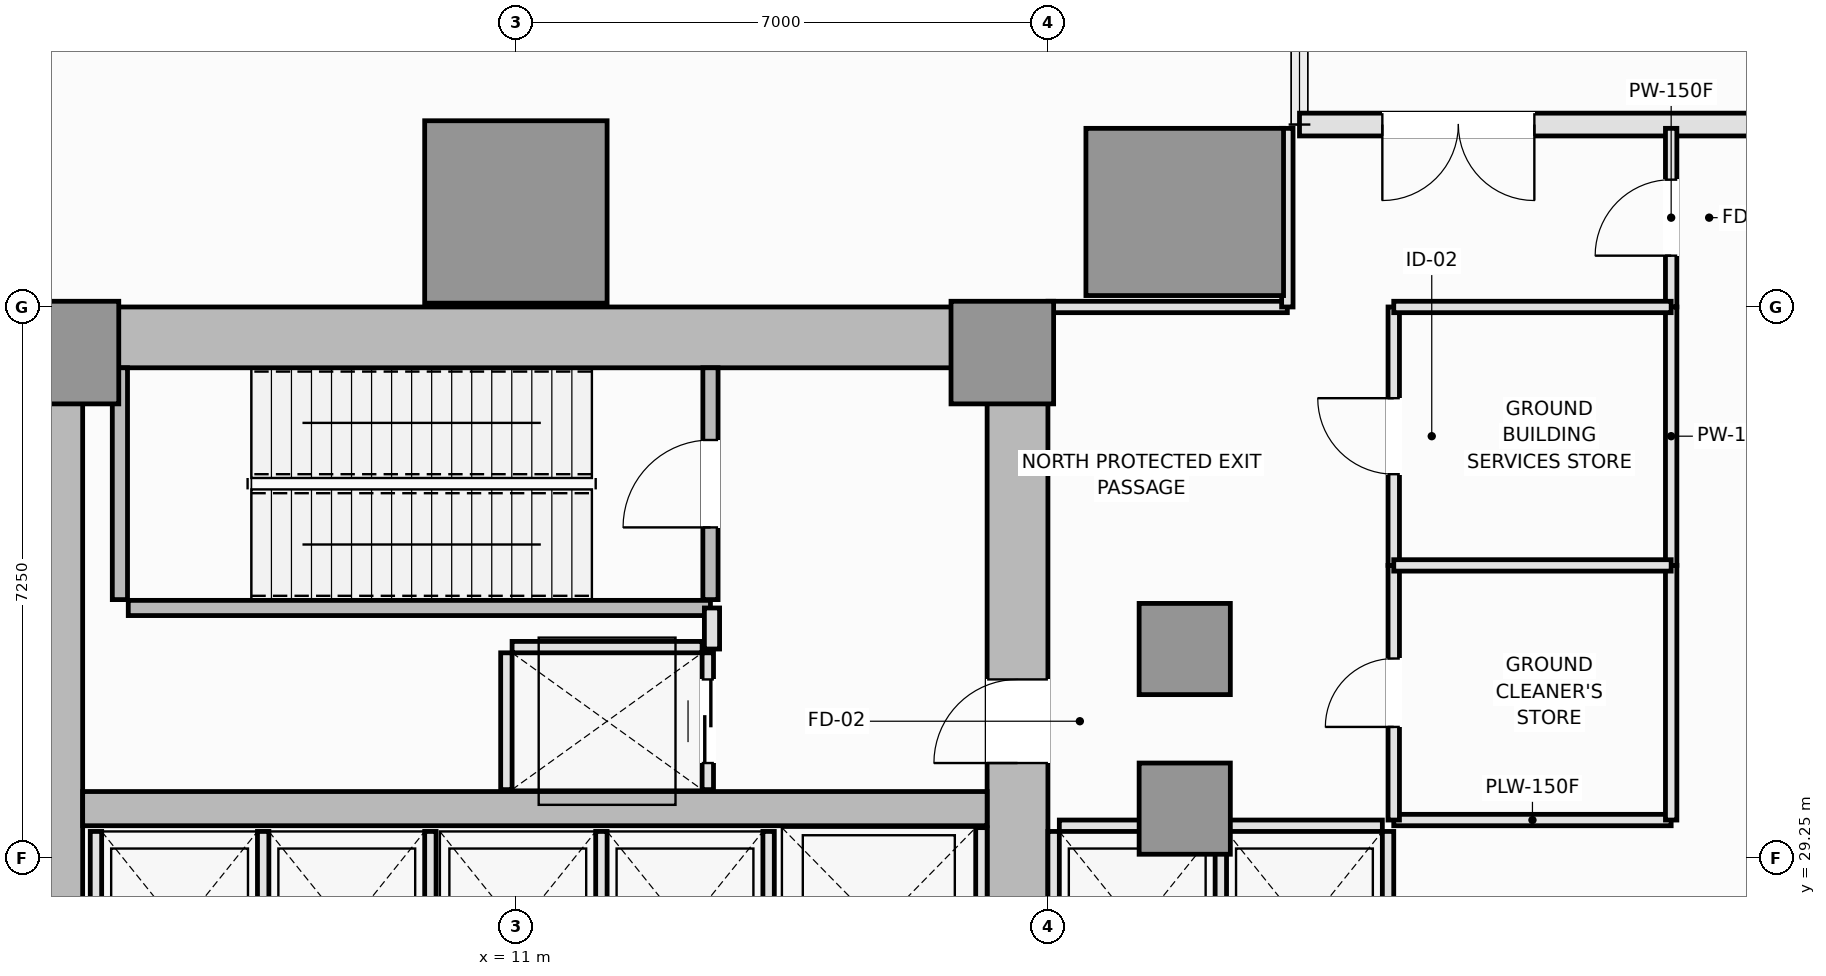
"""IFC4 building model, lengths in metres.
Left out: names, types, materials, properties, quantities, classifications, styles, units other than length and angle.
Written with IfcOpenShell. Run it as: python <this file> out.ifc"""

import sys

from ifc_helpers import new_model, si_unit, direction, frame, frame_2d, origin, origin_2d, place, context, subcontext, project, spatial, rectangle, extrude, element, fill, save


model = new_model("IFC4")
c1 = context("Model", 3, precision=1e-05, world=origin(), true_north=direction((0.0, 1.0)))
c2 = subcontext(c1, "Body", "Model", "MODEL_VIEW")
j1 = project(units=[si_unit("LENGTHUNIT", "METRE"), si_unit("PLANEANGLEUNIT", "RADIAN")], contexts=[c1])
p1 = place(None, origin())
s1 = spatial("IfcSite", under=j1, at=p1, CompositionType="ELEMENT")
p2 = place(p1, origin())
s2 = spatial("IfcBuilding", under=s1, at=p2, CompositionType="ELEMENT")
p3 = place(p2, origin())
s3 = spatial("IfcBuildingStorey", under=s2, at=p3, CompositionType="ELEMENT", Elevation=0.0)
p4 = place(p3, frame((4.5, 36.1, 0.0), z_axis=(0.0, 0.0, 1.0), x_axis=(1.0, 0.0, 0.0)))
e1 = element("IfcWall", 1, at=p4, inside=s3, PredefinedType="SHEAR", context=c2, shape_type="SweptSolid", body=[
    extrude(rectangle(XDim=13.5, YDim=0.8, at=frame_2d((6.75, 0.0))), origin(), (0.0, 0.0, 1.0), 6.0),
])
p5 = place(p3, frame((4.9, 14.8, 0.0), z_axis=(0.0, 0.0, 1.0), x_axis=(0.0, 1.0, 0.0)))
e2 = element("IfcWall", 2, at=p5, inside=s3, PredefinedType="SHEAR", context=c2, shape_type="SweptSolid", body=[
    extrude(rectangle(XDim=20.9, YDim=0.8, at=frame_2d((10.45, 0.0))), origin(), (0.0, 0.0, 1.0), 6.0),
])
p6 = place(p3, frame((17.6, 27.05, 0.0), z_axis=(0.0, 0.0, 1.0), x_axis=(0.0, 1.0, 0.0)))
e3 = element("IfcWall", 3, at=p6, inside=s3, PredefinedType="SHEAR", context=c2, shape_type="SweptSolid", body=[
    extrude(rectangle(XDim=8.65, YDim=0.8, at=frame_2d((4.325, 0.0))), origin(), (0.0, 0.0, 1.0), 6.0),
])
p7 = place(p6, frame((3.45, 0.0, 0.0)))
e4 = element("IfcOpeningElement", 4, at=p7, cuts=e3, PredefinedType="OPENING", context=c2, shape_type="SweptSolid", body=[
    extrude(rectangle(XDim=1.1, YDim=2.15, at=frame_2d((0.55, 1.075))), frame((0.0, 0.41, 0.0), z_axis=(0.0, -1.0, 0.0), x_axis=(1.0, 0.0, 0.0)), (0.0, 0.0, 1.0), 0.82),
])
p8 = place(p3, frame((5.3, 29.9, 0.0), z_axis=(0.0, 0.0, 1.0), x_axis=(1.0, 0.0, 0.0)))
e5 = element("IfcWall", 5, at=p8, inside=s3, PredefinedType="SHEAR", context=c2, shape_type="SweptSolid", body=[
    extrude(rectangle(XDim=11.9, YDim=0.45, at=frame_2d((5.95, 0.0))), origin(), (0.0, 0.0, 1.0), 6.0),
])
for number, where, z_axis, x_axis in (
    (6, (5.1, 35.9, 0.0), (0.0, 0.0, 1.0), (1.0, 0.0, 0.0)),
    (7, (17.4, 35.9, 0.0), (0.0, 0.0, 1.0), (1.0, 0.0, 0.0)),
):
    element("IfcColumn", number, at=place(p3, frame(where, z_axis=z_axis, x_axis=x_axis)), inside=s3, PredefinedType="PILASTER", context=c2, shape_type="SweptSolid", body=[
        extrude(rectangle(XDim=1.35, YDim=1.35, at=origin_2d()), origin(), (0.0, 0.0, 1.0), 6.0),
    ])
p9 = place(p3, frame((11.0, 37.75, 0.0), z_axis=(0.0, 0.0, 1.0), x_axis=(1.0, 0.0, 0.0)))
e8 = element("IfcColumn", 8, at=p9, inside=s3, PredefinedType="COLUMN", context=c2, shape_type="SweptSolid", body=[
    extrude(rectangle(XDim=2.4, YDim=2.4, at=origin_2d()), origin(), (0.0, 0.0, 1.0), 6.0),
])
p10 = place(p3, frame((19.8, 37.75, 0.0), z_axis=(0.0, 0.0, 1.0), x_axis=(1.0, 0.0, 0.0)))
e9 = element("IfcColumn", 9, at=p10, inside=s3, PredefinedType="COLUMN", context=c2, shape_type="SweptSolid", body=[
    extrude(rectangle(XDim=2.6, YDim=2.2, at=origin_2d()), origin(), (0.0, 0.0, 1.0), 6.0),
])
for number, where, z_axis, x_axis in (
    (10, (19.8, 29.9, 0.0), (0.0, 0.0, 1.0), (1.0, 0.0, 0.0)),
    (11, (19.8, 32.0, 0.0), (0.0, 0.0, 1.0), (1.0, 0.0, 0.0)),
):
    element("IfcColumn", number, at=place(p3, frame(where, z_axis=z_axis, x_axis=x_axis)), inside=s3, PredefinedType="COLUMN", context=c2, shape_type="SweptSolid", body=[
        extrude(rectangle(XDim=1.2, YDim=1.2, at=origin_2d()), origin(), (0.0, 0.0, 1.0), 6.0),
    ])
p11 = place(p3, frame((35.2, 38.9, 0.0), z_axis=(0.0, 0.0, 1.0), x_axis=(-1.0, 0.0, 0.0)))
e12 = element("IfcWall", 12, at=p11, inside=s3, PredefinedType="SOLIDWALL", context=c2, shape_type="SweptSolid", body=[
    extrude(rectangle(XDim=13.89, YDim=0.3, at=frame_2d((6.945, 0.0))), origin(), (0.0, 0.0, 1.0), 5.8),
])
p12 = place(p11, frame((1.6, 0.0, 0.0)))
e13 = element("IfcOpeningElement", 13, at=p12, cuts=e12, PredefinedType="OPENING", context=c2, shape_type="SweptSolid", body=[
    extrude(rectangle(XDim=2.0, YDim=2.4, at=frame_2d((1.0, 1.2))), frame((0.0, 0.16, 0.0), z_axis=(0.0, -1.0, 0.0), x_axis=(1.0, 0.0, 0.0)), (0.0, 0.0, 1.0), 0.32),
])
p13 = place(p11, frame((10.8, 0.0, 0.0)))
e14 = element("IfcOpeningElement", 14, at=p13, cuts=e12, PredefinedType="OPENING", context=c2, shape_type="SweptSolid", body=[
    extrude(rectangle(XDim=2.0, YDim=2.4, at=frame_2d((1.0, 1.2))), frame((0.0, 0.16, 0.0), z_axis=(0.0, -1.0, 0.0), x_axis=(1.0, 0.0, 0.0)), (0.0, 0.0, 1.0), 0.32),
])
p14 = place(p3, frame((5.79, 32.65, 0.0), z_axis=(0.0, 0.0, 1.0), x_axis=(0.0, 1.0, 0.0)))
e15 = element("IfcWall", 15, at=p14, inside=s3, PredefinedType="SOLIDWALL", context=c2, shape_type="SweptSolid", body=[
    extrude(rectangle(XDim=3.05, YDim=0.2, at=frame_2d((1.525, 0.0))), origin(), (0.0, 0.0, 1.0), 6.0),
])
p15 = place(p3, frame((5.9, 32.54, 0.0), z_axis=(0.0, 0.0, 1.0), x_axis=(1.0, 0.0, 0.0)))
e16 = element("IfcWall", 16, at=p15, inside=s3, PredefinedType="SOLIDWALL", context=c2, shape_type="SweptSolid", body=[
    extrude(rectangle(XDim=7.66, YDim=0.2, at=frame_2d((3.83, 0.0))), origin(), (0.0, 0.0, 1.0), 6.0),
])
p16 = place(p3, frame((13.56, 32.65, 0.0), z_axis=(0.0, 0.0, 1.0), x_axis=(0.0, 1.0, 0.0)))
e17 = element("IfcWall", 17, at=p16, inside=s3, PredefinedType="SOLIDWALL", context=c2, shape_type="SweptSolid", body=[
    extrude(rectangle(XDim=3.05, YDim=0.2, at=frame_2d((1.525, 0.0))), origin(), (0.0, 0.0, 1.0), 6.0),
])
p17 = place(p16, frame((0.95, 0.0, 0.0)))
e18 = element("IfcOpeningElement", 18, at=p17, cuts=e17, PredefinedType="OPENING", context=c2, shape_type="SweptSolid", body=[
    extrude(rectangle(XDim=1.15, YDim=2.15, at=frame_2d((0.575, 1.075))), frame((0.0, 0.11, 0.0), z_axis=(0.0, -1.0, 0.0), x_axis=(1.0, 0.0, 0.0)), (0.0, 0.0, 1.0), 0.22),
])
p18 = place(p3, frame((18.15, 29.675, 0.0), z_axis=(0.0, 0.0, 1.0), x_axis=(1.0, 0.0, 0.0)))
e19 = element("IfcWall", 19, at=p18, inside=s3, PredefinedType="PARTITIONING", context=c2, shape_type="SweptSolid", body=[
    extrude(rectangle(XDim=2.05, YDim=0.15, at=frame_2d((1.025, 0.0))), origin(), (0.0, 0.0, 1.0), 5.8),
])
for number, where, z_axis, x_axis in (
    (20, (18.075, 27.05, 0.0), (0.0, 0.0, 1.0), (0.0, 1.0, 0.0)),
    (21, (20.275, 27.05, 0.0), (0.0, 0.0, 1.0), (0.0, 1.0, 0.0)),
):
    element("IfcWall", number, at=place(p3, frame(where, z_axis=z_axis, x_axis=x_axis)), inside=s3, PredefinedType="PARTITIONING", context=c2, shape_type="SweptSolid", body=[
        extrude(rectangle(XDim=2.55, YDim=0.15, at=frame_2d((1.275, 0.0))), origin(), (0.0, 0.0, 1.0), 5.8),
    ])
p19 = place(p3, frame((20.35, 29.675, 0.0), z_axis=(0.0, 0.0, 1.0), x_axis=(1.0, 0.0, 0.0)))
e22 = element("IfcWall", 22, at=p19, inside=s3, PredefinedType="PARTITIONING", context=c2, shape_type="SweptSolid", body=[
    extrude(rectangle(XDim=2.05, YDim=0.15, at=frame_2d((1.025, 0.0))), origin(), (0.0, 0.0, 1.0), 5.8),
])
for number, where, z_axis, x_axis in (
    (23, (22.475, 27.05, 0.0), (0.0, 0.0, 1.0), (0.0, 1.0, 0.0)),
    (24, (5.475, 27.05, 0.0), (0.0, 0.0, 1.0), (0.0, 1.0, 0.0)),
    (25, (7.675, 27.05, 0.0), (0.0, 0.0, 1.0), (0.0, 1.0, 0.0)),
    (26, (9.875, 27.05, 0.0), (0.0, 0.0, 1.0), (0.0, 1.0, 0.0)),
    (27, (12.125, 27.05, 0.0), (0.0, 0.0, 1.0), (0.0, 1.0, 0.0)),
    (28, (14.325, 27.05, 0.0), (0.0, 0.0, 1.0), (0.0, 1.0, 0.0)),
):
    element("IfcWall", number, at=place(p3, frame(where, z_axis=z_axis, x_axis=x_axis)), inside=s3, PredefinedType="PARTITIONING", context=c2, shape_type="SweptSolid", body=[
        extrude(rectangle(XDim=2.55, YDim=0.15, at=frame_2d((1.275, 0.0))), origin(), (0.0, 0.0, 1.0), 5.8),
    ])
p20 = place(p3, frame((17.125, 27.05, 0.0), z_axis=(0.0, 0.0, 1.0), x_axis=(0.0, 1.0, 0.0)))
e29 = element("IfcWall", 29, at=p20, inside=s3, PredefinedType="PARTITIONING", context=c2, shape_type="SweptSolid", body=[
    extrude(rectangle(XDim=2.6, YDim=0.15, at=frame_2d((1.3, 0.0))), origin(), (0.0, 0.0, 1.0), 5.8),
])
p21 = place(p3, frame((10.95, 32.025, 0.0), z_axis=(0.0, 0.0, 1.0), x_axis=(1.0, 0.0, 0.0)))
e30 = element("IfcWall", 30, at=p21, inside=s3, PredefinedType="PARTITIONING", context=c2, shape_type="SweptSolid", body=[
    extrude(rectangle(XDim=2.5, YDim=0.15, at=frame_2d((1.25, 0.0))), origin(), (0.0, 0.0, 1.0), 5.8),
])
p22 = place(p3, frame((10.875, 30.15, 0.0), z_axis=(0.0, 0.0, 1.0), x_axis=(0.0, 1.0, 0.0)))
e31 = element("IfcWall", 31, at=p22, inside=s3, PredefinedType="PARTITIONING", context=c2, shape_type="SweptSolid", body=[
    extrude(rectangle(XDim=1.8, YDim=0.15, at=frame_2d((0.9, 0.0))), origin(), (0.0, 0.0, 1.0), 5.8),
])
p23 = place(p3, frame((13.525, 30.15, 0.0), z_axis=(0.0, 0.0, 1.0), x_axis=(0.0, 1.0, 0.0)))
e32 = element("IfcWall", 32, at=p23, inside=s3, PredefinedType="PARTITIONING", context=c2, shape_type="SweptSolid", body=[
    extrude(rectangle(XDim=1.8, YDim=0.15, at=frame_2d((0.9, 0.0))), origin(), (0.0, 0.0, 1.0), 5.8),
])
p24 = place(p23, frame((0.35, 0.0, 0.0)))
e33 = element("IfcOpeningElement", 33, at=p24, cuts=e32, PredefinedType="OPENING", context=c2, shape_type="SweptSolid", body=[
    extrude(rectangle(XDim=1.1, YDim=2.2, at=frame_2d((0.55, 1.1))), frame((0.0, 0.085, 0.0), z_axis=(0.0, -1.0, 0.0), x_axis=(1.0, 0.0, 0.0)), (0.0, 0.0, 1.0), 0.17),
])
p25 = place(p3, frame((13.58, 32.0, 0.0), z_axis=(0.0, 0.0, 1.0), x_axis=(0.0, 1.0, 0.0)))
e34 = element("IfcWall", 34, at=p25, inside=s3, PredefinedType="PARTITIONING", context=c2, shape_type="SweptSolid", body=[
    extrude(rectangle(XDim=0.54, YDim=0.2, at=frame_2d((0.27, 0.0))), origin(), (0.0, 0.0, 1.0), 5.8),
])
p26 = place(p3, frame((22.55, 29.75, 0.0), z_axis=(0.0, 0.0, 1.0), x_axis=(1.0, 0.0, 0.0)))
e35 = element("IfcWall", 35, at=p26, inside=s3, PredefinedType="PLUMBINGWALL", context=c2, shape_type="SweptSolid", body=[
    extrude(rectangle(XDim=3.65, YDim=0.15, at=frame_2d((1.825, 0.0))), origin(), (0.0, 0.0, 1.0), 5.8),
])
p27 = place(p3, frame((26.2, 36.5, 0.0), z_axis=(0.0, 0.0, 1.0), x_axis=(0.0, 1.0, 0.0)))
e36 = element("IfcWall", 36, at=p27, inside=s3, PredefinedType="PARTITIONING", context=c2, shape_type="SweptSolid", body=[
    extrude(rectangle(XDim=2.35, YDim=0.15, at=frame_2d((1.175, 0.0))), origin(), (0.0, 0.0, 1.0), 5.8),
])
p28 = place(p27, frame((0.675, 0.0, 0.0)))
e37 = element("IfcOpeningElement", 37, at=p28, cuts=e36, PredefinedType="OPENING", context=c2, shape_type="SweptSolid", body=[
    extrude(rectangle(XDim=1.0, YDim=2.15, at=frame_2d((0.5, 1.075))), frame((0.0, 0.085, 0.0), z_axis=(0.0, -1.0, 0.0), x_axis=(1.0, 0.0, 0.0)), (0.0, 0.0, 1.0), 0.17),
])
p29 = place(p3, frame((26.2, 29.75, 0.0), z_axis=(0.0, 0.0, 1.0), x_axis=(0.0, 1.0, 0.0)))
e38 = element("IfcWall", 38, at=p29, inside=s3, PredefinedType="PLUMBINGWALL", context=c2, shape_type="SweptSolid", body=[
    extrude(rectangle(XDim=3.35, YDim=0.15, at=frame_2d((1.675, 0.0))), origin(), (0.0, 0.0, 1.0), 5.8),
])
p30 = place(p3, frame((26.2, 33.1, 0.0), z_axis=(0.0, 0.0, 1.0), x_axis=(0.0, 1.0, 0.0)))
e39 = element("IfcWall", 39, at=p30, inside=s3, PredefinedType="PARTITIONING", context=c2, shape_type="SweptSolid", body=[
    extrude(rectangle(XDim=3.4, YDim=0.15, at=frame_2d((1.7, 0.0))), origin(), (0.0, 0.0, 1.0), 5.8),
])
p31 = place(p3, frame((18.0, 36.5, 0.0), z_axis=(0.0, 0.0, 1.0), x_axis=(1.0, 0.0, 0.0)))
e40 = element("IfcWall", 40, at=p31, inside=s3, PredefinedType="PARTITIONING", context=c2, shape_type="SweptSolid", body=[
    extrude(rectangle(XDim=3.15, YDim=0.15, at=frame_2d((1.575, 0.0))), origin(), (0.0, 0.0, 1.0), 5.8),
])
p32 = place(p3, frame((22.55, 29.75, 0.0), z_axis=(0.0, 0.0, 1.0), x_axis=(0.0, 1.0, 0.0)))
e41 = element("IfcWall", 41, at=p32, inside=s3, PredefinedType="PLUMBINGWALL", context=c2, shape_type="SweptSolid", body=[
    extrude(rectangle(XDim=3.35, YDim=0.15, at=frame_2d((1.675, 0.0))), origin(), (0.0, 0.0, 1.0), 5.8),
])
p33 = place(p32, frame((1.225, 0.0, 0.0)))
e42 = element("IfcOpeningElement", 42, at=p33, cuts=e41, PredefinedType="OPENING", context=c2, shape_type="SweptSolid", body=[
    extrude(rectangle(XDim=0.9, YDim=2.1, at=frame_2d((0.45, 1.05))), frame((0.0, 0.085, 0.0), z_axis=(0.0, -1.0, 0.0), x_axis=(1.0, 0.0, 0.0)), (0.0, 0.0, 1.0), 0.17),
])
p34 = place(p3, frame((22.55, 33.1, 0.0), z_axis=(0.0, 0.0, 1.0), x_axis=(0.0, 1.0, 0.0)))
e43 = element("IfcWall", 43, at=p34, inside=s3, PredefinedType="PARTITIONING", context=c2, shape_type="SweptSolid", body=[
    extrude(rectangle(XDim=3.4, YDim=0.15, at=frame_2d((1.7, 0.0))), origin(), (0.0, 0.0, 1.0), 5.8),
])
p35 = place(p34, frame((1.2, 0.0, 0.0)))
e44 = element("IfcOpeningElement", 44, at=p35, cuts=e43, PredefinedType="OPENING", context=c2, shape_type="SweptSolid", body=[
    extrude(rectangle(XDim=1.0, YDim=2.15, at=frame_2d((0.5, 1.075))), frame((0.0, 0.085, 0.0), z_axis=(0.0, -1.0, 0.0), x_axis=(1.0, 0.0, 0.0)), (0.0, 0.0, 1.0), 0.17),
])
p36 = place(p3, frame((21.15, 36.5, 0.0), z_axis=(0.0, 0.0, 1.0), x_axis=(0.0, 1.0, 0.0)))
e45 = element("IfcWall", 45, at=p36, inside=s3, PredefinedType="PARTITIONING", context=c2, shape_type="SweptSolid", body=[
    extrude(rectangle(XDim=2.35, YDim=0.15, at=frame_2d((1.175, 0.0))), origin(), (0.0, 0.0, 1.0), 5.8),
])
p37 = place(p3, frame((22.55, 36.5, 0.0), z_axis=(0.0, 0.0, 1.0), x_axis=(1.0, 0.0, 0.0)))
e46 = element("IfcWall", 46, at=p37, inside=s3, PredefinedType="PARTITIONING", context=c2, shape_type="SweptSolid", body=[
    extrude(rectangle(XDim=3.65, YDim=0.15, at=frame_2d((1.825, 0.0))), origin(), (0.0, 0.0, 1.0), 5.8),
])
p38 = place(p3, frame((22.55, 33.1, 0.0), z_axis=(0.0, 0.0, 1.0), x_axis=(1.0, 0.0, 0.0)))
e47 = element("IfcWall", 47, at=p38, inside=s3, PredefinedType="PLUMBINGWALL", context=c2, shape_type="SweptSolid", body=[
    extrude(rectangle(XDim=3.65, YDim=0.15, at=frame_2d((1.825, 0.0))), origin(), (0.0, 0.0, 1.0), 5.8),
])
p39 = place(p13, frame((2.0, 0.0, 0.0), z_axis=(0.0, 0.0, 1.0), x_axis=(-1.0, 0.0, 0.0)))
e48 = element("IfcDoor", 48, at=p39, inside=s3, OperationType="DOUBLE_DOOR_SINGLE_SWING", PredefinedType="DOOR", context=c2, shape_type="SweptSolid", body=[
    extrude(rectangle(XDim=2.0, YDim=2.4, at=frame_2d((1.0, 1.2))), frame((0.0, 0.025, 0.0), z_axis=(0.0, -1.0, 0.0), x_axis=(1.0, 0.0, 0.0)), (0.0, 0.0, 1.0), 0.05),
])
fill(e14, e48)
p40 = place(p17, origin())
e49 = element("IfcDoor", 49, at=p40, inside=s3, OperationType="SINGLE_SWING_LEFT", PredefinedType="DOOR", context=c2, shape_type="SweptSolid", body=[
    extrude(rectangle(XDim=1.15, YDim=2.15, at=frame_2d((0.575, 1.075))), frame((0.0, 0.025, 0.0), z_axis=(0.0, -1.0, 0.0), x_axis=(1.0, 0.0, 0.0)), (0.0, 0.0, 1.0), 0.05),
])
fill(e18, e49)
p41 = place(p24, origin())
e50 = element("IfcDoor", 50, at=p41, inside=s3, OperationType="DOUBLE_DOOR_SLIDING", PredefinedType="DOOR", context=c2, shape_type="SweptSolid", body=[
    extrude(rectangle(XDim=1.1, YDim=2.2, at=frame_2d((0.55, 1.1))), frame((0.0, 0.025, 0.0), z_axis=(0.0, -1.0, 0.0), x_axis=(1.0, 0.0, 0.0)), (0.0, 0.0, 1.0), 0.05),
])
fill(e33, e50)
p42 = place(p7, origin())
e51 = element("IfcDoor", 51, at=p42, inside=s3, OperationType="SINGLE_SWING_LEFT", PredefinedType="DOOR", context=c2, shape_type="SweptSolid", body=[
    extrude(rectangle(XDim=1.1, YDim=2.15, at=frame_2d((0.55, 1.075))), frame((0.0, 0.025, 0.0), z_axis=(0.0, -1.0, 0.0), x_axis=(1.0, 0.0, 0.0)), (0.0, 0.0, 1.0), 0.05),
])
fill(e4, e51)
p43 = place(p28, origin())
e52 = element("IfcDoor", 52, at=p43, inside=s3, OperationType="SINGLE_SWING_LEFT", PredefinedType="DOOR", context=c2, shape_type="SweptSolid", body=[
    extrude(rectangle(XDim=1.0, YDim=2.15, at=frame_2d((0.5, 1.075))), frame((0.0, 0.025, 0.0), z_axis=(0.0, -1.0, 0.0), x_axis=(1.0, 0.0, 0.0)), (0.0, 0.0, 1.0), 0.05),
])
fill(e37, e52)
p44 = place(p33, origin())
e53 = element("IfcDoor", 53, at=p44, inside=s3, OperationType="SINGLE_SWING_LEFT", PredefinedType="DOOR", context=c2, shape_type="SweptSolid", body=[
    extrude(rectangle(XDim=0.9, YDim=2.1, at=frame_2d((0.45, 1.05))), frame((0.0, 0.025, 0.0), z_axis=(0.0, -1.0, 0.0), x_axis=(1.0, 0.0, 0.0)), (0.0, 0.0, 1.0), 0.05),
])
fill(e42, e53)
p45 = place(p35, origin())
e54 = element("IfcDoor", 54, at=p45, inside=s3, OperationType="SINGLE_SWING_RIGHT", PredefinedType="DOOR", context=c2, shape_type="SweptSolid", body=[
    extrude(rectangle(XDim=1.0, YDim=2.15, at=frame_2d((0.5, 1.075))), frame((0.0, 0.025, 0.0), z_axis=(0.0, -1.0, 0.0), x_axis=(1.0, 0.0, 0.0)), (0.0, 0.0, 1.0), 0.05),
])
fill(e44, e54)
save(model, sys.argv[1])
